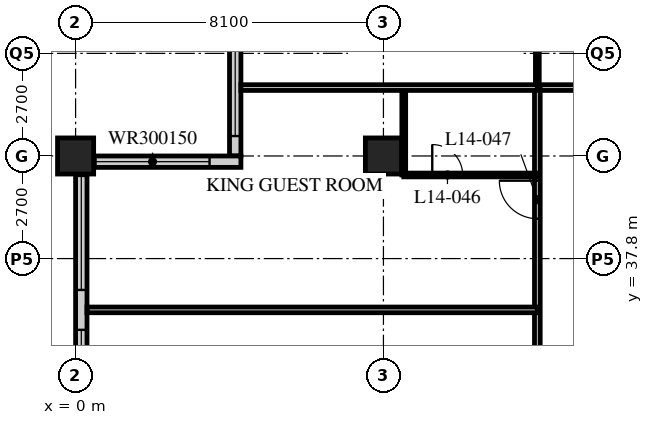
"""IFC4 building model, lengths in metres.
Left out: names, types, materials, properties, quantities, classifications, styles, units other than length and angle.
Written with IfcOpenShell. Run it as: python <this file> out.ifc"""

import sys

from ifc_helpers import new_model, si_unit, direction, frame, frame_2d, origin, origin_2d, place, context, subcontext, project, spatial, rectangle, hollow_rectangle, extrude, element, fill, save


model = new_model("IFC4")
c1 = context("Model", 3, precision=1e-05, world=origin(), true_north=direction((0.0, 1.0)))
c2 = subcontext(c1, "Body", "Model", "MODEL_VIEW")
j1 = project(units=[si_unit("LENGTHUNIT", "METRE"), si_unit("PLANEANGLEUNIT", "RADIAN")], contexts=[c1])
p1 = place(None, origin())
s1 = spatial("IfcSite", under=j1, at=p1, CompositionType="ELEMENT")
p2 = place(p1, origin())
s2 = spatial("IfcBuilding", under=s1, at=p2, CompositionType="ELEMENT")
p3 = place(p2, frame((0.0, 0.0, 60.2)))
s3 = spatial("IfcBuildingStorey", under=s2, at=p3, CompositionType="ELEMENT", Elevation=60.2)
for number, where, z_axis, x_axis in (
    (1, (0.0, 40.5, 0.0), (0.0, 0.0, 1.0), (1.0, 0.0, 0.0)),
    (2, (8.1, 40.5, 0.0), (0.0, 0.0, 1.0), (1.0, 0.0, 0.0)),
):
    element("IfcColumn", number, at=place(p3, frame(where, z_axis=z_axis, x_axis=x_axis)), inside=s3, PredefinedType="COLUMN", context=c2, shape_type="SweptSolid", body=[
        extrude(hollow_rectangle(XDim=0.95, YDim=0.95, WallThickness=0.095, at=origin_2d()), origin(), (0.0, 0.0, 1.0), 3.4),
    ])
p4 = place(p3, frame((4.2, 44.25, 0.0), z_axis=(0.0, 0.0, 1.0), x_axis=(0.0, -1.0, 0.0)))
e3 = element("IfcWall", 3, at=p4, inside=s3, PredefinedType="SOLIDWALL", context=c2, shape_type="SweptSolid", body=[
    extrude(rectangle(XDim=3.75, YDim=0.3, at=frame_2d((1.875, 0.0))), origin(), (0.0, 0.0, 1.0), 3.19),
])
p5 = place(p4, frame((0.225, 0.0, 0.9)))
e4 = element("IfcOpeningElement", 4, at=p5, cuts=e3, PredefinedType="OPENING", context=c2, shape_type="SweptSolid", body=[
    extrude(rectangle(XDim=3.0, YDim=1.5, at=frame_2d((1.5, 0.75))), frame((0.0, 0.16, 0.0), z_axis=(0.0, -1.0, 0.0), x_axis=(1.0, 0.0, 0.0)), (0.0, 0.0, 1.0), 0.32),
])
p6 = place(p3, frame((4.35, 40.35, 0.0), z_axis=(0.0, 0.0, 1.0), x_axis=(-1.0, 0.0, 0.0)))
e5 = element("IfcWall", 5, at=p6, inside=s3, PredefinedType="SOLIDWALL", context=c2, shape_type="SweptSolid", body=[
    extrude(rectangle(XDim=4.35, YDim=0.3, at=frame_2d((2.175, 0.0))), origin(), (0.0, 0.0, 1.0), 3.19),
])
p7 = place(p6, frame((0.825, 0.0, 0.9)))
e6 = element("IfcOpeningElement", 6, at=p7, cuts=e5, PredefinedType="OPENING", context=c2, shape_type="SweptSolid", body=[
    extrude(rectangle(XDim=3.0, YDim=1.5, at=frame_2d((1.5, 0.75))), frame((0.0, 0.16, 0.0), z_axis=(0.0, -1.0, 0.0), x_axis=(1.0, 0.0, 0.0)), (0.0, 0.0, 1.0), 0.32),
])
p8 = place(p3, frame((0.15, 40.2, 0.0), z_axis=(0.0, 0.0, 1.0), x_axis=(0.0, -1.0, 0.0)))
e7 = element("IfcWall", 7, at=p8, inside=s3, PredefinedType="SOLIDWALL", context=c2, shape_type="SweptSolid", body=[
    extrude(rectangle(XDim=32.1, YDim=0.3, at=frame_2d((16.05, 0.0))), origin(), (0.0, 0.0, 1.0), 3.19),
])
p9 = place(p8, frame((0.225, 0.0, 0.9)))
e8 = element("IfcOpeningElement", 8, at=p9, cuts=e7, PredefinedType="OPENING", context=c2, shape_type="SweptSolid", body=[
    extrude(rectangle(XDim=3.0, YDim=2.0, at=frame_2d((1.5, 1.0))), frame((0.0, 0.16, 0.0), z_axis=(0.0, -1.0, 0.0), x_axis=(1.0, 0.0, 0.0)), (0.0, 0.0, 1.0), 0.32),
])
p10 = place(p8, frame((4.275, 0.0, 0.9)))
e9 = element("IfcOpeningElement", 9, at=p10, cuts=e7, PredefinedType="OPENING", context=c2, shape_type="SweptSolid", body=[
    extrude(rectangle(XDim=3.0, YDim=2.0, at=frame_2d((1.5, 1.0))), frame((0.0, 0.16, 0.0), z_axis=(0.0, -1.0, 0.0), x_axis=(1.0, 0.0, 0.0)), (0.0, 0.0, 1.0), 0.32),
])
p11 = place(p8, frame((8.325, 0.0, 0.9)))
e10 = element("IfcOpeningElement", 10, at=p11, cuts=e7, PredefinedType="OPENING", context=c2, shape_type="SweptSolid", body=[
    extrude(rectangle(XDim=3.0, YDim=2.0, at=frame_2d((1.5, 1.0))), frame((0.0, 0.16, 0.0), z_axis=(0.0, -1.0, 0.0), x_axis=(1.0, 0.0, 0.0)), (0.0, 0.0, 1.0), 0.32),
])
p12 = place(p8, frame((12.375, 0.0, 0.9)))
e11 = element("IfcOpeningElement", 11, at=p12, cuts=e7, PredefinedType="OPENING", context=c2, shape_type="SweptSolid", body=[
    extrude(rectangle(XDim=3.0, YDim=2.0, at=frame_2d((1.5, 1.0))), frame((0.0, 0.16, 0.0), z_axis=(0.0, -1.0, 0.0), x_axis=(1.0, 0.0, 0.0)), (0.0, 0.0, 1.0), 0.32),
])
p13 = place(p8, frame((16.425, 0.0, 0.9)))
e12 = element("IfcOpeningElement", 12, at=p13, cuts=e7, PredefinedType="OPENING", context=c2, shape_type="SweptSolid", body=[
    extrude(rectangle(XDim=3.0, YDim=2.0, at=frame_2d((1.5, 1.0))), frame((0.0, 0.16, 0.0), z_axis=(0.0, -1.0, 0.0), x_axis=(1.0, 0.0, 0.0)), (0.0, 0.0, 1.0), 0.32),
])
p14 = place(p8, frame((20.475, 0.0, 0.9)))
e13 = element("IfcOpeningElement", 13, at=p14, cuts=e7, PredefinedType="OPENING", context=c2, shape_type="SweptSolid", body=[
    extrude(rectangle(XDim=3.0, YDim=2.0, at=frame_2d((1.5, 1.0))), frame((0.0, 0.16, 0.0), z_axis=(0.0, -1.0, 0.0), x_axis=(1.0, 0.0, 0.0)), (0.0, 0.0, 1.0), 0.32),
])
p15 = place(p8, frame((24.525, 0.0, 0.9)))
e14 = element("IfcOpeningElement", 14, at=p15, cuts=e7, PredefinedType="OPENING", context=c2, shape_type="SweptSolid", body=[
    extrude(rectangle(XDim=3.0, YDim=2.0, at=frame_2d((1.5, 1.0))), frame((0.0, 0.16, 0.0), z_axis=(0.0, -1.0, 0.0), x_axis=(1.0, 0.0, 0.0)), (0.0, 0.0, 1.0), 0.32),
])
p16 = place(p8, frame((28.575, 0.0, 0.9)))
e15 = element("IfcOpeningElement", 15, at=p16, cuts=e7, PredefinedType="OPENING", context=c2, shape_type="SweptSolid", body=[
    extrude(rectangle(XDim=3.0, YDim=2.0, at=frame_2d((1.5, 1.0))), frame((0.0, 0.16, 0.0), z_axis=(0.0, -1.0, 0.0), x_axis=(1.0, 0.0, 0.0)), (0.0, 0.0, 1.0), 0.32),
])
p17 = place(p3, frame((12.15, 42.3, 0.0), z_axis=(0.0, 0.0, 1.0), x_axis=(1.0, 0.0, 0.0)))
e16 = element("IfcWall", 16, at=p17, inside=s3, PredefinedType="PARTITIONING", context=c2, shape_type="SweptSolid", body=[
    extrude(rectangle(XDim=32.4, YDim=0.15, at=frame_2d((16.2, 0.0))), origin(), (0.0, 0.0, 1.0), 3.19),
])
p18 = place(p17, frame((6.5, 0.0, 0.0)))
e17 = element("IfcOpeningElement", 17, at=p18, cuts=e16, PredefinedType="OPENING", context=c2, shape_type="SweptSolid", body=[
    extrude(rectangle(XDim=1.0, YDim=2.1, at=frame_2d((0.5, 1.05))), frame((0.0, 0.085, 0.0), z_axis=(0.0, -1.0, 0.0), x_axis=(1.0, 0.0, 0.0)), (0.0, 0.0, 1.0), 0.17),
])
p19 = place(p17, frame((10.55, 0.0, 0.0)))
e18 = element("IfcOpeningElement", 18, at=p19, cuts=e16, PredefinedType="OPENING", context=c2, shape_type="SweptSolid", body=[
    extrude(rectangle(XDim=1.0, YDim=2.1, at=frame_2d((0.5, 1.05))), frame((0.0, 0.085, 0.0), z_axis=(0.0, -1.0, 0.0), x_axis=(1.0, 0.0, 0.0)), (0.0, 0.0, 1.0), 0.17),
])
p20 = place(p17, frame((14.6, 0.0, 0.0)))
e19 = element("IfcOpeningElement", 19, at=p20, cuts=e16, PredefinedType="OPENING", context=c2, shape_type="SweptSolid", body=[
    extrude(rectangle(XDim=1.0, YDim=2.1, at=frame_2d((0.5, 1.05))), frame((0.0, 0.085, 0.0), z_axis=(0.0, -1.0, 0.0), x_axis=(1.0, 0.0, 0.0)), (0.0, 0.0, 1.0), 0.17),
])
p21 = place(p17, frame((18.65, 0.0, 0.0)))
e20 = element("IfcOpeningElement", 20, at=p21, cuts=e16, PredefinedType="OPENING", context=c2, shape_type="SweptSolid", body=[
    extrude(rectangle(XDim=1.0, YDim=2.1, at=frame_2d((0.5, 1.05))), frame((0.0, 0.085, 0.0), z_axis=(0.0, -1.0, 0.0), x_axis=(1.0, 0.0, 0.0)), (0.0, 0.0, 1.0), 0.17),
])
p22 = place(p17, frame((22.7, 0.0, 0.0)))
e21 = element("IfcOpeningElement", 21, at=p22, cuts=e16, PredefinedType="OPENING", context=c2, shape_type="SweptSolid", body=[
    extrude(rectangle(XDim=1.0, YDim=2.1, at=frame_2d((0.5, 1.05))), frame((0.0, 0.085, 0.0), z_axis=(0.0, -1.0, 0.0), x_axis=(1.0, 0.0, 0.0)), (0.0, 0.0, 1.0), 0.17),
])
p23 = place(p17, frame((26.75, 0.0, 0.0)))
e22 = element("IfcOpeningElement", 22, at=p23, cuts=e16, PredefinedType="OPENING", context=c2, shape_type="SweptSolid", body=[
    extrude(rectangle(XDim=1.0, YDim=2.1, at=frame_2d((0.5, 1.05))), frame((0.0, 0.085, 0.0), z_axis=(0.0, -1.0, 0.0), x_axis=(1.0, 0.0, 0.0)), (0.0, 0.0, 1.0), 0.17),
])
p24 = place(p17, frame((28.775, 0.0, 0.0)))
e23 = element("IfcOpeningElement", 23, at=p24, cuts=e16, PredefinedType="OPENING", context=c2, shape_type="SweptSolid", body=[
    extrude(rectangle(XDim=1.0, YDim=2.1, at=frame_2d((0.5, 1.05))), frame((0.0, 0.085, 0.0), z_axis=(0.0, -1.0, 0.0), x_axis=(1.0, 0.0, 0.0)), (0.0, 0.0, 1.0), 0.17),
])
p25 = place(p17, frame((2.625, 0.0, 0.0)))
e24 = element("IfcOpeningElement", 24, at=p25, cuts=e16, PredefinedType="OPENING", context=c2, shape_type="SweptSolid", body=[
    extrude(rectangle(XDim=1.0, YDim=2.1, at=frame_2d((0.5, 1.05))), frame((0.0, 0.085, 0.0), z_axis=(0.0, -1.0, 0.0), x_axis=(1.0, 0.0, 0.0)), (0.0, 0.0, 1.0), 0.17),
])
p26 = place(p3, frame((12.15, 12.15, 0.0), z_axis=(0.0, 0.0, 1.0), x_axis=(0.0, 1.0, 0.0)))
e25 = element("IfcWall", 25, at=p26, inside=s3, PredefinedType="PARTITIONING", context=c2, shape_type="SweptSolid", body=[
    extrude(rectangle(XDim=30.15, YDim=0.15, at=frame_2d((15.075, 0.0))), origin(), (0.0, 0.0, 1.0), 3.19),
])
p27 = place(p26, frame((2.45, 0.0, 0.0)))
e26 = element("IfcOpeningElement", 26, at=p27, cuts=e25, PredefinedType="OPENING", context=c2, shape_type="SweptSolid", body=[
    extrude(rectangle(XDim=1.0, YDim=2.1, at=frame_2d((0.5, 1.05))), frame((0.0, 0.085, 0.0), z_axis=(0.0, -1.0, 0.0), x_axis=(1.0, 0.0, 0.0)), (0.0, 0.0, 1.0), 0.17),
])
p28 = place(p26, frame((6.5, 0.0, 0.0)))
e27 = element("IfcOpeningElement", 27, at=p28, cuts=e25, PredefinedType="OPENING", context=c2, shape_type="SweptSolid", body=[
    extrude(rectangle(XDim=1.0, YDim=2.1, at=frame_2d((0.5, 1.05))), frame((0.0, 0.085, 0.0), z_axis=(0.0, -1.0, 0.0), x_axis=(1.0, 0.0, 0.0)), (0.0, 0.0, 1.0), 0.17),
])
p29 = place(p26, frame((10.55, 0.0, 0.0)))
e28 = element("IfcOpeningElement", 28, at=p29, cuts=e25, PredefinedType="OPENING", context=c2, shape_type="SweptSolid", body=[
    extrude(rectangle(XDim=1.0, YDim=2.1, at=frame_2d((0.5, 1.05))), frame((0.0, 0.085, 0.0), z_axis=(0.0, -1.0, 0.0), x_axis=(1.0, 0.0, 0.0)), (0.0, 0.0, 1.0), 0.17),
])
p30 = place(p26, frame((14.6, 0.0, 0.0)))
e29 = element("IfcOpeningElement", 29, at=p30, cuts=e25, PredefinedType="OPENING", context=c2, shape_type="SweptSolid", body=[
    extrude(rectangle(XDim=1.0, YDim=2.1, at=frame_2d((0.5, 1.05))), frame((0.0, 0.085, 0.0), z_axis=(0.0, -1.0, 0.0), x_axis=(1.0, 0.0, 0.0)), (0.0, 0.0, 1.0), 0.17),
])
p31 = place(p26, frame((21.65, 0.0, 0.0)))
e30 = element("IfcOpeningElement", 30, at=p31, cuts=e25, PredefinedType="OPENING", context=c2, shape_type="SweptSolid", body=[
    extrude(rectangle(XDim=1.0, YDim=2.1, at=frame_2d((0.5, 1.05))), frame((0.0, 0.085, 0.0), z_axis=(0.0, -1.0, 0.0), x_axis=(1.0, 0.0, 0.0)), (0.0, 0.0, 1.0), 0.17),
])
p32 = place(p26, frame((26.7, 0.0, 0.0)))
e31 = element("IfcOpeningElement", 31, at=p32, cuts=e25, PredefinedType="OPENING", context=c2, shape_type="SweptSolid", body=[
    extrude(rectangle(XDim=1.0, YDim=2.1, at=frame_2d((0.5, 1.05))), frame((0.0, 0.085, 0.0), z_axis=(0.0, -1.0, 0.0), x_axis=(1.0, 0.0, 0.0)), (0.0, 0.0, 1.0), 0.17),
])
p33 = place(p3, frame((12.15, 36.45, 0.0), z_axis=(0.0, 0.0, 1.0), x_axis=(-1.0, 0.0, 0.0)))
e32 = element("IfcWall", 32, at=p33, inside=s3, PredefinedType="PARTITIONING", context=c2, shape_type="SweptSolid", body=[
    extrude(rectangle(XDim=11.85, YDim=0.15, at=frame_2d((5.925, 0.0))), origin(), (0.0, 0.0, 1.0), 3.19),
])
p34 = place(p3, frame((8.635, 40.0, 0.0), z_axis=(0.0, 0.0, 1.0), x_axis=(0.0, 1.0, 0.0)))
e33 = element("IfcWall", 33, at=p34, inside=s3, PredefinedType="PARTITIONING", context=c2, shape_type="SweptSolid", body=[
    extrude(rectangle(XDim=2.3, YDim=0.1, at=frame_2d((1.15, 0.0))), origin(), (0.0, 0.0, 1.0), 3.19),
])
p35 = place(p3, frame((12.15, 40.0, 0.0), z_axis=(0.0, 0.0, 1.0), x_axis=(-1.0, 0.0, 0.0)))
e34 = element("IfcWall", 34, at=p35, inside=s3, PredefinedType="PARTITIONING", context=c2, shape_type="SweptSolid", body=[
    extrude(rectangle(XDim=3.515, YDim=0.1, at=frame_2d((1.757, 0.0))), origin(), (0.0, 0.0, 1.0), 3.19),
])
p36 = place(p35, frame((1.965, 0.0, 0.0)))
e35 = element("IfcOpeningElement", 35, at=p36, cuts=e34, PredefinedType="OPENING", context=c2, shape_type="SweptSolid", body=[
    extrude(rectangle(XDim=0.8, YDim=2.1, at=frame_2d((0.4, 1.05))), frame((0.0, 0.06, 0.0), z_axis=(0.0, -1.0, 0.0), x_axis=(1.0, 0.0, 0.0)), (0.0, 0.0, 1.0), 0.12),
])
p37 = place(p3, frame((12.15, 42.3, 0.0), z_axis=(0.0, 0.0, 1.0), x_axis=(0.0, 1.0, 0.0)))
e36 = element("IfcWall", 36, at=p37, inside=s3, PredefinedType="PARTITIONING", context=c2, shape_type="SweptSolid", body=[
    extrude(rectangle(XDim=2.4, YDim=0.1, at=frame_2d((1.2, 0.0))), origin(), (0.0, 0.0, 1.0), 3.19),
])
p38 = place(p3, frame((4.35, 42.3, 0.0), z_axis=(0.0, 0.0, 1.0), x_axis=(1.0, 0.0, 0.0)))
e37 = element("IfcWall", 37, at=p38, inside=s3, PredefinedType="PARTITIONING", context=c2, shape_type="SweptSolid", body=[
    extrude(rectangle(XDim=7.8, YDim=0.15, at=frame_2d((3.9, 0.0))), origin(), (0.0, 0.0, 1.0), 3.19),
])
p39 = place(p5, origin())
e38 = element("IfcWindow", 38, at=p39, inside=s3, PartitioningType="SINGLE_PANEL", PredefinedType="WINDOW", context=c2, shape_type="SweptSolid", body=[
    extrude(rectangle(XDim=3.0, YDim=1.5, at=frame_2d((1.5, 0.75))), frame((0.0, 0.03, 0.0), z_axis=(0.0, -1.0, 0.0), x_axis=(1.0, 0.0, 0.0)), (0.0, 0.0, 1.0), 0.06),
])
fill(e4, e38)
p40 = place(p7, origin())
e39 = element("IfcWindow", 39, at=p40, inside=s3, PartitioningType="SINGLE_PANEL", PredefinedType="WINDOW", context=c2, shape_type="SweptSolid", body=[
    extrude(rectangle(XDim=3.0, YDim=1.5, at=frame_2d((1.5, 0.75))), frame((0.0, 0.03, 0.0), z_axis=(0.0, -1.0, 0.0), x_axis=(1.0, 0.0, 0.0)), (0.0, 0.0, 1.0), 0.06),
])
fill(e6, e39)
p41 = place(p9, origin())
e40 = element("IfcWindow", 40, at=p41, inside=s3, PartitioningType="SINGLE_PANEL", PredefinedType="WINDOW", context=c2, shape_type="SweptSolid", body=[
    extrude(rectangle(XDim=3.0, YDim=2.0, at=frame_2d((1.5, 1.0))), frame((0.0, 0.03, 0.0), z_axis=(0.0, -1.0, 0.0), x_axis=(1.0, 0.0, 0.0)), (0.0, 0.0, 1.0), 0.06),
])
fill(e8, e40)
p42 = place(p10, origin())
e41 = element("IfcWindow", 41, at=p42, inside=s3, PartitioningType="SINGLE_PANEL", PredefinedType="WINDOW", context=c2, shape_type="SweptSolid", body=[
    extrude(rectangle(XDim=3.0, YDim=2.0, at=frame_2d((1.5, 1.0))), frame((0.0, 0.03, 0.0), z_axis=(0.0, -1.0, 0.0), x_axis=(1.0, 0.0, 0.0)), (0.0, 0.0, 1.0), 0.06),
])
fill(e9, e41)
p43 = place(p36, origin())
e42 = element("IfcDoor", 42, at=p43, inside=s3, OperationType="SINGLE_SWING_LEFT", PredefinedType="DOOR", context=c2, shape_type="SweptSolid", body=[
    extrude(rectangle(XDim=0.8, YDim=2.1, at=frame_2d((0.4, 1.05))), frame((0.0, 0.025, 0.0), z_axis=(0.0, -1.0, 0.0), x_axis=(1.0, 0.0, 0.0)), (0.0, 0.0, 1.0), 0.05),
])
fill(e35, e42)
p44 = place(p32, origin())
e43 = element("IfcDoor", 43, at=p44, inside=s3, OperationType="SINGLE_SWING_RIGHT", PredefinedType="DOOR", context=c2, shape_type="SweptSolid", body=[
    extrude(rectangle(XDim=1.0, YDim=2.1, at=frame_2d((0.5, 1.05))), frame((0.0, 0.025, 0.0), z_axis=(0.0, -1.0, 0.0), x_axis=(1.0, 0.0, 0.0)), (0.0, 0.0, 1.0), 0.05),
])
fill(e31, e43)
save(model, sys.argv[1])
